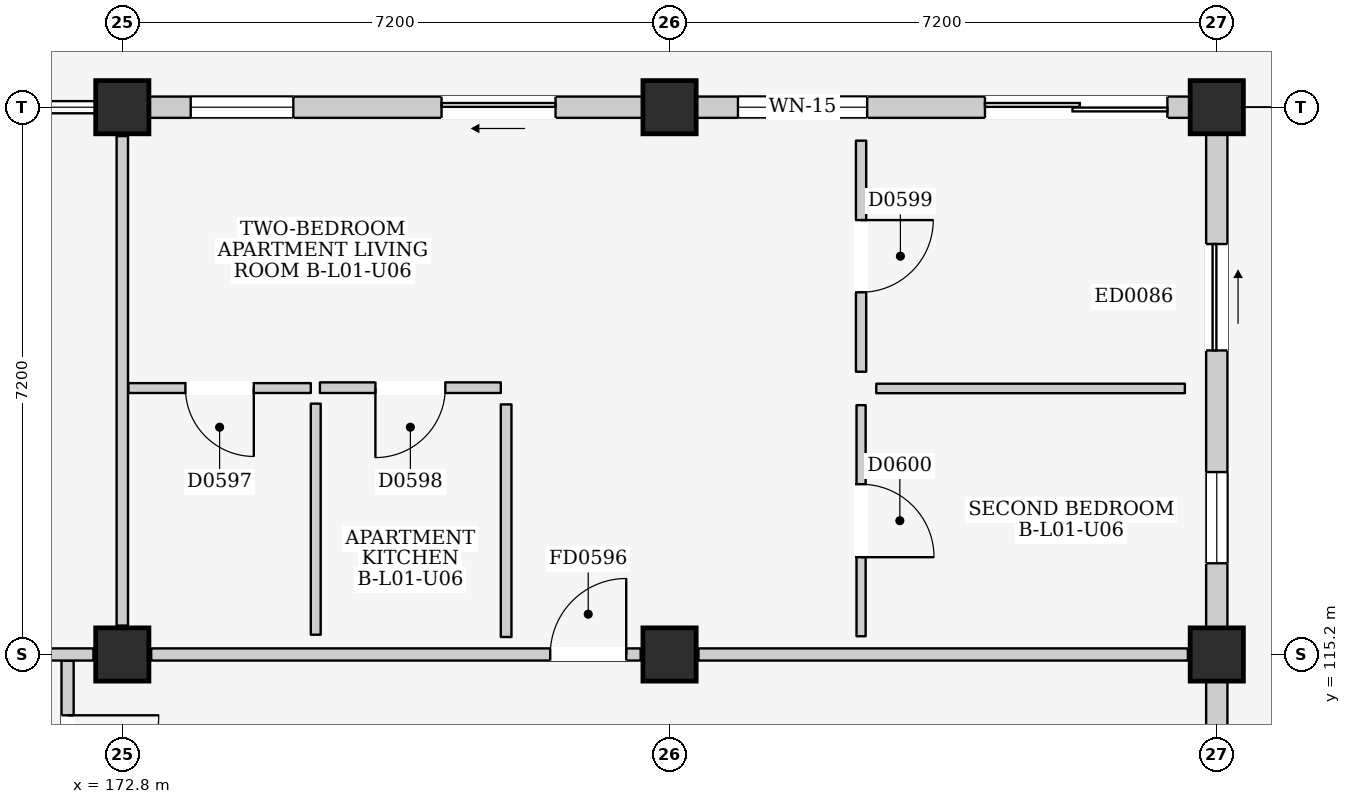
"""IFC4 building model, lengths in metres.
Left out: names, types, materials, properties, quantities, classifications, styles, units other than length and angle.
Written with IfcOpenShell. Run it as: python <this file> out.ifc"""

import sys

from ifc_helpers import new_model, si_unit, direction, frame, frame_2d, origin, origin_2d, place, context, subcontext, project, spatial, rectangle, extrude, element, fill, save


model = new_model("IFC4")
c1 = context("Model", 3, precision=1e-05, world=origin(), true_north=direction((0.0, 1.0)))
c2 = subcontext(c1, "Body", "Model", "MODEL_VIEW")
j1 = project(units=[si_unit("LENGTHUNIT", "METRE"), si_unit("PLANEANGLEUNIT", "RADIAN")], contexts=[c1])
p1 = place(None, origin())
s1 = spatial("IfcSite", under=j1, at=p1, CompositionType="ELEMENT")
p2 = place(p1, origin())
s2 = spatial("IfcBuilding", under=s1, at=p2, CompositionType="ELEMENT")
p3 = place(p2, frame((0.0, 0.0, 4.5)))
s3 = spatial("IfcBuildingStorey", under=s2, at=p3, CompositionType="ELEMENT", Elevation=4.5)
for number, where, z_axis, x_axis in (
    (1, (172.8, 115.2, 0.0), (0.0, 0.0, 1.0), (1.0, 0.0, 0.0)),
    (2, (172.8, 122.4, 0.0), (0.0, 0.0, 1.0), (1.0, 0.0, 0.0)),
    (3, (180.0, 115.2, 0.0), (0.0, 0.0, 1.0), (1.0, 0.0, 0.0)),
    (4, (180.0, 122.4, 0.0), (0.0, 0.0, 1.0), (1.0, 0.0, 0.0)),
    (5, (187.2, 115.2, 0.0), (0.0, 0.0, 1.0), (1.0, 0.0, 0.0)),
    (6, (187.2, 122.4, 0.0), (0.0, 0.0, 1.0), (1.0, 0.0, 0.0)),
):
    element("IfcColumn", number, at=place(p3, frame(where, z_axis=z_axis, x_axis=x_axis)), inside=s3, PredefinedType="COLUMN", context=c2, shape_type="SweptSolid", body=[
        extrude(rectangle(XDim=0.7, YDim=0.7, at=origin_2d()), origin(), (0.0, 0.0, 1.0), 4.5),
    ])
p4 = place(p3, frame((173.15, 122.4, 0.0), z_axis=(0.0, 0.0, 1.0), x_axis=(1.0, 0.0, 0.0)))
e7 = element("IfcWall", 7, at=p4, inside=s3, PredefinedType="ELEMENTEDWALL", context=c2, shape_type="SweptSolid", body=[
    extrude(rectangle(XDim=6.5, YDim=0.28, at=frame_2d((3.25, 0.0))), origin(), (0.0, 0.0, 1.0), 3.715),
])
p5 = place(p4, frame((3.85, 0.0, 0.0)))
e8 = element("IfcOpeningElement", 8, at=p5, cuts=e7, PredefinedType="OPENING", context=c2, shape_type="SweptSolid", body=[
    extrude(rectangle(XDim=1.5, YDim=2.12, at=frame_2d((0.75, 1.06))), frame((0.0, 0.155, 0.0), z_axis=(0.0, -1.0, 0.0), x_axis=(1.0, 0.0, 0.0)), (0.0, 0.0, 1.0), 0.31),
])
p6 = place(p4, frame((0.55, 0.0, 0.9)))
e9 = element("IfcOpeningElement", 9, at=p6, cuts=e7, PredefinedType="OPENING", context=c2, shape_type="SweptSolid", body=[
    extrude(rectangle(XDim=1.35, YDim=1.5, at=frame_2d((0.675, 0.75))), frame((0.0, 0.155, 0.0), z_axis=(0.0, -1.0, 0.0), x_axis=(1.0, 0.0, 0.0)), (0.0, 0.0, 1.0), 0.31),
])
p7 = place(p3, frame((187.2, 108.35, 0.0), z_axis=(0.0, 0.0, 1.0), x_axis=(0.0, 1.0, 0.0)))
e10 = element("IfcWall", 10, at=p7, inside=s3, PredefinedType="ELEMENTEDWALL", context=c2, shape_type="SweptSolid", body=[
    extrude(rectangle(XDim=6.5, YDim=0.28, at=frame_2d((3.25, 0.0))), origin(), (0.0, 0.0, 1.0), 3.715),
])
p8 = place(p7, frame((3.65, 0.0, 0.0)))
e11 = element("IfcOpeningElement", 11, at=p8, cuts=e10, PredefinedType="OPENING", context=c2, shape_type="SweptSolid", body=[
    extrude(rectangle(XDim=1.4, YDim=2.1, at=frame_2d((0.7, 1.05))), frame((0.0, 0.155, 0.0), z_axis=(0.0, -1.0, 0.0), x_axis=(1.0, 0.0, 0.0)), (0.0, 0.0, 1.0), 0.31),
])
p9 = place(p3, frame((180.35, 122.4, 0.0), z_axis=(0.0, 0.0, 1.0), x_axis=(1.0, 0.0, 0.0)))
e12 = element("IfcWall", 12, at=p9, inside=s3, PredefinedType="ELEMENTEDWALL", context=c2, shape_type="SweptSolid", body=[
    extrude(rectangle(XDim=6.5, YDim=0.28, at=frame_2d((3.25, 0.0))), origin(), (0.0, 0.0, 1.0), 3.715),
])
p10 = place(p9, frame((3.8, 0.0, 0.0)))
e13 = element("IfcOpeningElement", 13, at=p10, cuts=e12, PredefinedType="OPENING", context=c2, shape_type="SweptSolid", body=[
    extrude(rectangle(XDim=2.4, YDim=2.12, at=frame_2d((1.2, 1.06))), frame((0.0, 0.155, 0.0), z_axis=(0.0, -1.0, 0.0), x_axis=(1.0, 0.0, 0.0)), (0.0, 0.0, 1.0), 0.31),
])
p11 = place(p9, frame((0.55, 0.0, 0.9)))
e14 = element("IfcOpeningElement", 14, at=p11, cuts=e12, PredefinedType="OPENING", context=c2, shape_type="SweptSolid", body=[
    extrude(rectangle(XDim=1.7, YDim=1.45, at=frame_2d((0.85, 0.725))), frame((0.0, 0.155, 0.0), z_axis=(0.0, -1.0, 0.0), x_axis=(1.0, 0.0, 0.0)), (0.0, 0.0, 1.0), 0.31),
])
p12 = place(p3, frame((187.2, 115.55, 0.0), z_axis=(0.0, 0.0, 1.0), x_axis=(0.0, 1.0, 0.0)))
e15 = element("IfcWall", 15, at=p12, inside=s3, PredefinedType="ELEMENTEDWALL", context=c2, shape_type="SweptSolid", body=[
    extrude(rectangle(XDim=6.5, YDim=0.28, at=frame_2d((3.25, 0.0))), origin(), (0.0, 0.0, 1.0), 3.715),
])
p13 = place(p12, frame((3.65, 0.0, 0.0)))
e16 = element("IfcOpeningElement", 16, at=p13, cuts=e15, PredefinedType="OPENING", context=c2, shape_type="SweptSolid", body=[
    extrude(rectangle(XDim=1.4, YDim=2.1, at=frame_2d((0.7, 1.05))), frame((0.0, 0.155, 0.0), z_axis=(0.0, -1.0, 0.0), x_axis=(1.0, 0.0, 0.0)), (0.0, 0.0, 1.0), 0.31),
])
p14 = place(p12, frame((0.85, 0.0, 0.95)))
e17 = element("IfcOpeningElement", 17, at=p14, cuts=e15, PredefinedType="OPENING", context=c2, shape_type="SweptSolid", body=[
    extrude(rectangle(XDim=1.2, YDim=1.35, at=frame_2d((0.6, 0.675))), frame((0.0, 0.155, 0.0), z_axis=(0.0, -1.0, 0.0), x_axis=(1.0, 0.0, 0.0)), (0.0, 0.0, 1.0), 0.31),
])
p15 = place(p3, frame((172.08, 110.8, 0.0), z_axis=(0.0, 0.0, 1.0), x_axis=(0.0, 1.0, 0.0)))
e18 = element("IfcWall", 18, at=p15, inside=s3, PredefinedType="PARTITIONING", context=c2, shape_type="SweptSolid", body=[
    extrude(rectangle(XDim=4.32, YDim=0.16, at=frame_2d((2.16, 0.0))), origin(), (0.0, 0.0, 1.0), 4.25),
])
p16 = place(p15, frame((2.4, 0.0, 0.0)))
e19 = element("IfcOpeningElement", 19, at=p16, cuts=e18, PredefinedType="OPENING", context=c2, shape_type="SweptSolid", body=[
    extrude(rectangle(XDim=1.2, YDim=2.2, at=frame_2d((0.6, 1.1))), frame((0.0, 0.095, 0.0), z_axis=(0.0, -1.0, 0.0), x_axis=(1.0, 0.0, 0.0)), (0.0, 0.0, 1.0), 0.19),
])
p17 = place(p3, frame((165.98, 115.2, 0.0), z_axis=(0.0, 0.0, 1.0), x_axis=(1.0, 0.0, 0.0)))
e20 = element("IfcWall", 20, at=p17, inside=s3, PredefinedType="PARTITIONING", context=c2, shape_type="SweptSolid", body=[
    extrude(rectangle(XDim=6.44, YDim=0.16, at=frame_2d((3.22, 0.0))), origin(), (0.0, 0.0, 1.0), 3.635),
])
p18 = place(p17, frame((4.07, 0.0, 0.0)))
e21 = element("IfcOpeningElement", 21, at=p18, cuts=e20, PredefinedType="OPENING", context=c2, shape_type="SweptSolid", body=[
    extrude(rectangle(XDim=1.0, YDim=2.15, at=frame_2d((0.5, 1.075))), frame((0.0, 0.095, 0.0), z_axis=(0.0, -1.0, 0.0), x_axis=(1.0, 0.0, 0.0)), (0.0, 0.0, 1.0), 0.19),
])
p19 = place(p3, frame((172.8, 115.58, 0.0), z_axis=(0.0, 0.0, 1.0), x_axis=(0.0, 1.0, 0.0)))
e22 = element("IfcWall", 22, at=p19, inside=s3, PredefinedType="PARTITIONING", context=c2, shape_type="SweptSolid", body=[
    extrude(rectangle(XDim=6.44, YDim=0.15, at=frame_2d((3.22, 0.0))), origin(), (0.0, 0.0, 1.0), 3.685),
])
p20 = place(p3, frame((173.18, 115.2, 0.0), z_axis=(0.0, 0.0, 1.0), x_axis=(1.0, 0.0, 0.0)))
e23 = element("IfcWall", 23, at=p20, inside=s3, PredefinedType="PARTITIONING", context=c2, shape_type="SweptSolid", body=[
    extrude(rectangle(XDim=6.44, YDim=0.16, at=frame_2d((3.22, 0.0))), origin(), (0.0, 0.0, 1.0), 3.635),
])
p21 = place(p20, frame((5.25, 0.0, 0.0)))
e24 = element("IfcOpeningElement", 24, at=p21, cuts=e23, PredefinedType="OPENING", context=c2, shape_type="SweptSolid", body=[
    extrude(rectangle(XDim=1.0, YDim=2.15, at=frame_2d((0.5, 1.075))), frame((0.0, 0.095, 0.0), z_axis=(0.0, -1.0, 0.0), x_axis=(1.0, 0.0, 0.0)), (0.0, 0.0, 1.0), 0.19),
])
p22 = place(p3, frame((180.38, 115.2, 0.0), z_axis=(0.0, 0.0, 1.0), x_axis=(1.0, 0.0, 0.0)))
e25 = element("IfcWall", 25, at=p22, inside=s3, PredefinedType="PARTITIONING", context=c2, shape_type="SweptSolid", body=[
    extrude(rectangle(XDim=6.44, YDim=0.16, at=frame_2d((3.22, 0.0))), origin(), (0.0, 0.0, 1.0), 3.635),
])
p23 = place(p3, frame((172.88, 118.705, 0.0), z_axis=(0.0, 0.0, 1.0), x_axis=(1.0, 0.0, 0.0)))
e26 = element("IfcWall", 26, at=p23, inside=s3, PredefinedType="PARTITIONING", context=c2, shape_type="SweptSolid", body=[
    extrude(rectangle(XDim=2.4, YDim=0.13, at=frame_2d((1.2, 0.0))), origin(), (0.0, 0.0, 1.0), 4.25),
])
p24 = place(p23, frame((0.75, 0.0, 0.0)))
e27 = element("IfcOpeningElement", 27, at=p24, cuts=e26, PredefinedType="OPENING", context=c2, shape_type="SweptSolid", body=[
    extrude(rectangle(XDim=0.9, YDim=2.1, at=frame_2d((0.45, 1.05))), frame((0.0, 0.08, 0.0), z_axis=(0.0, -1.0, 0.0), x_axis=(1.0, 0.0, 0.0)), (0.0, 0.0, 1.0), 0.16),
])
p25 = place(p3, frame((175.345, 115.46, 0.0), z_axis=(0.0, 0.0, 1.0), x_axis=(0.0, 1.0, 0.0)))
e28 = element("IfcWall", 28, at=p25, inside=s3, PredefinedType="PARTITIONING", context=c2, shape_type="SweptSolid", body=[
    extrude(rectangle(XDim=3.04, YDim=0.13, at=frame_2d((1.52, 0.0))), origin(), (0.0, 0.0, 1.0), 4.25),
])
p26 = place(p3, frame((175.4, 118.71, 0.0), z_axis=(0.0, 0.0, 1.0), x_axis=(1.0, 0.0, 0.0)))
e29 = element("IfcWall", 29, at=p26, inside=s3, PredefinedType="PARTITIONING", context=c2, shape_type="SweptSolid", body=[
    extrude(rectangle(XDim=2.38, YDim=0.14, at=frame_2d((1.19, 0.0))), origin(), (0.0, 0.0, 1.0), 4.25),
])
p27 = place(p26, frame((0.73, 0.0, 0.0)))
e30 = element("IfcOpeningElement", 30, at=p27, cuts=e29, PredefinedType="OPENING", context=c2, shape_type="SweptSolid", body=[
    extrude(rectangle(XDim=0.92, YDim=2.1, at=frame_2d((0.46, 1.05))), frame((0.0, 0.085, 0.0), z_axis=(0.0, -1.0, 0.0), x_axis=(1.0, 0.0, 0.0)), (0.0, 0.0, 1.0), 0.17),
])
p28 = place(p3, frame((177.85, 115.43, 0.0), z_axis=(0.0, 0.0, 1.0), x_axis=(0.0, 1.0, 0.0)))
e31 = element("IfcWall", 31, at=p28, inside=s3, PredefinedType="PARTITIONING", context=c2, shape_type="SweptSolid", body=[
    extrude(rectangle(XDim=3.06, YDim=0.14, at=frame_2d((1.53, 0.0))), origin(), (0.0, 0.0, 1.0), 4.25),
])
p29 = place(p3, frame((182.52, 118.92, 0.0), z_axis=(0.0, 0.0, 1.0), x_axis=(0.0, 1.0, 0.0)))
e32 = element("IfcWall", 32, at=p29, inside=s3, PredefinedType="PARTITIONING", context=c2, shape_type="SweptSolid", body=[
    extrude(rectangle(XDim=3.04, YDim=0.135, at=frame_2d((1.52, 0.0))), origin(), (0.0, 0.0, 1.0), 4.25),
])
p30 = place(p29, frame((1.045, 0.0, 0.0)))
e33 = element("IfcOpeningElement", 33, at=p30, cuts=e32, PredefinedType="OPENING", context=c2, shape_type="SweptSolid", body=[
    extrude(rectangle(XDim=0.95, YDim=2.15, at=frame_2d((0.475, 1.075))), frame((0.0, 0.083, 0.0), z_axis=(0.0, -1.0, 0.0), x_axis=(1.0, 0.0, 0.0)), (0.0, 0.0, 1.0), 0.165),
])
p31 = place(p3, frame((182.72, 118.7, 0.0), z_axis=(0.0, 0.0, 1.0), x_axis=(1.0, 0.0, 0.0)))
e34 = element("IfcWall", 34, at=p31, inside=s3, PredefinedType="PARTITIONING", context=c2, shape_type="SweptSolid", body=[
    extrude(rectangle(XDim=4.06, YDim=0.125, at=frame_2d((2.03, 0.0))), origin(), (0.0, 0.0, 1.0), 4.25),
])
p32 = place(p3, frame((182.52, 115.44, 0.0), z_axis=(0.0, 0.0, 1.0), x_axis=(0.0, 1.0, 0.0)))
e35 = element("IfcWall", 35, at=p32, inside=s3, PredefinedType="PARTITIONING", context=c2, shape_type="SweptSolid", body=[
    extrude(rectangle(XDim=3.04, YDim=0.12, at=frame_2d((1.52, 0.0))), origin(), (0.0, 0.0, 1.0), 4.25),
])
p33 = place(p32, frame((1.04, 0.0, 0.0)))
e36 = element("IfcOpeningElement", 36, at=p33, cuts=e35, PredefinedType="OPENING", context=c2, shape_type="SweptSolid", body=[
    extrude(rectangle(XDim=0.96, YDim=2.15, at=frame_2d((0.48, 1.075))), frame((0.0, 0.075, 0.0), z_axis=(0.0, -1.0, 0.0), x_axis=(1.0, 0.0, 0.0)), (0.0, 0.0, 1.0), 0.15),
])
p34 = place(p5, frame((1.5, 0.0, 0.0), z_axis=(0.0, 0.0, 1.0), x_axis=(-1.0, 0.0, 0.0)))
e37 = element("IfcDoor", 37, at=p34, inside=s3, OperationType="SLIDING_TO_LEFT", PredefinedType="DOOR", context=c2, shape_type="SweptSolid", body=[
    extrude(rectangle(XDim=1.5, YDim=2.12, at=frame_2d((0.75, 1.06))), frame((0.0, 0.025, 0.0), z_axis=(0.0, -1.0, 0.0), x_axis=(1.0, 0.0, 0.0)), (0.0, 0.0, 1.0), 0.05),
])
fill(e8, e37)
p35 = place(p6, origin())
e38 = element("IfcWindow", 38, at=p35, inside=s3, PartitioningType="SINGLE_PANEL", PredefinedType="WINDOW", context=c2, shape_type="SweptSolid", body=[
    extrude(rectangle(XDim=1.35, YDim=1.5, at=frame_2d((0.675, 0.75))), frame((0.0, 0.03, 0.0), z_axis=(0.0, -1.0, 0.0), x_axis=(1.0, 0.0, 0.0)), (0.0, 0.0, 1.0), 0.06),
])
fill(e9, e38)
p36 = place(p10, frame((2.4, 0.0, 0.0), z_axis=(0.0, 0.0, 1.0), x_axis=(-1.0, 0.0, 0.0)))
e39 = element("IfcDoor", 39, at=p36, inside=s3, OperationType="DOUBLE_DOOR_SLIDING", PredefinedType="DOOR", context=c2, shape_type="SweptSolid", body=[
    extrude(rectangle(XDim=2.4, YDim=2.12, at=frame_2d((1.2, 1.06))), frame((0.0, 0.025, 0.0), z_axis=(0.0, -1.0, 0.0), x_axis=(1.0, 0.0, 0.0)), (0.0, 0.0, 1.0), 0.05),
])
fill(e13, e39)
p37 = place(p11, origin())
e40 = element("IfcWindow", 40, at=p37, inside=s3, PartitioningType="DOUBLE_PANEL_VERTICAL", PredefinedType="WINDOW", context=c2, shape_type="SweptSolid", body=[
    extrude(rectangle(XDim=1.7, YDim=1.45, at=frame_2d((0.85, 0.725))), frame((0.0, 0.03, 0.0), z_axis=(0.0, -1.0, 0.0), x_axis=(1.0, 0.0, 0.0)), (0.0, 0.0, 1.0), 0.06),
])
fill(e14, e40)
p38 = place(p13, frame((1.4, 0.0, 0.0), z_axis=(0.0, 0.0, 1.0), x_axis=(-1.0, 0.0, 0.0)))
e41 = element("IfcDoor", 41, at=p38, inside=s3, OperationType="SLIDING_TO_RIGHT", PredefinedType="DOOR", context=c2, shape_type="SweptSolid", body=[
    extrude(rectangle(XDim=1.4, YDim=2.1, at=frame_2d((0.7, 1.05))), frame((0.0, 0.025, 0.0), z_axis=(0.0, -1.0, 0.0), x_axis=(1.0, 0.0, 0.0)), (0.0, 0.0, 1.0), 0.05),
])
fill(e16, e41)
p39 = place(p14, origin())
e42 = element("IfcWindow", 42, at=p39, inside=s3, PartitioningType="SINGLE_PANEL", PredefinedType="WINDOW", context=c2, shape_type="SweptSolid", body=[
    extrude(rectangle(XDim=1.2, YDim=1.35, at=frame_2d((0.6, 0.675))), frame((0.0, 0.03, 0.0), z_axis=(0.0, -1.0, 0.0), x_axis=(1.0, 0.0, 0.0)), (0.0, 0.0, 1.0), 0.06),
])
fill(e17, e42)
p40 = place(p16, frame((1.2, 0.0, 0.0), z_axis=(0.0, 0.0, 1.0), x_axis=(-1.0, 0.0, 0.0)))
e43 = element("IfcDoor", 43, at=p40, inside=s3, OperationType="SINGLE_SWING_LEFT", PredefinedType="DOOR", context=c2, shape_type="SweptSolid", body=[
    extrude(rectangle(XDim=1.2, YDim=2.2, at=frame_2d((0.6, 1.1))), frame((0.0, 0.025, 0.0), z_axis=(0.0, -1.0, 0.0), x_axis=(1.0, 0.0, 0.0)), (0.0, 0.0, 1.0), 0.05),
])
fill(e19, e43)
p41 = place(p21, origin())
e44 = element("IfcDoor", 44, at=p41, inside=s3, OperationType="SINGLE_SWING_RIGHT", PredefinedType="DOOR", context=c2, shape_type="SweptSolid", body=[
    extrude(rectangle(XDim=1.0, YDim=2.15, at=frame_2d((0.5, 1.075))), frame((0.0, 0.025, 0.0), z_axis=(0.0, -1.0, 0.0), x_axis=(1.0, 0.0, 0.0)), (0.0, 0.0, 1.0), 0.05),
])
fill(e24, e44)
p42 = place(p24, frame((0.9, 0.0, 0.0), z_axis=(0.0, 0.0, 1.0), x_axis=(-1.0, 0.0, 0.0)))
e45 = element("IfcDoor", 45, at=p42, inside=s3, OperationType="SINGLE_SWING_LEFT", PredefinedType="DOOR", context=c2, shape_type="SweptSolid", body=[
    extrude(rectangle(XDim=0.9, YDim=2.1, at=frame_2d((0.45, 1.05))), frame((0.0, 0.025, 0.0), z_axis=(0.0, -1.0, 0.0), x_axis=(1.0, 0.0, 0.0)), (0.0, 0.0, 1.0), 0.05),
])
fill(e27, e45)
p43 = place(p27, frame((0.92, 0.0, 0.0), z_axis=(0.0, 0.0, 1.0), x_axis=(-1.0, 0.0, 0.0)))
e46 = element("IfcDoor", 46, at=p43, inside=s3, OperationType="SINGLE_SWING_RIGHT", PredefinedType="DOOR", context=c2, shape_type="SweptSolid", body=[
    extrude(rectangle(XDim=0.92, YDim=2.1, at=frame_2d((0.46, 1.05))), frame((0.0, 0.025, 0.0), z_axis=(0.0, -1.0, 0.0), x_axis=(1.0, 0.0, 0.0)), (0.0, 0.0, 1.0), 0.05),
])
fill(e30, e46)
p44 = place(p30, frame((0.95, 0.0, 0.0), z_axis=(0.0, 0.0, 1.0), x_axis=(-1.0, 0.0, 0.0)))
e47 = element("IfcDoor", 47, at=p44, inside=s3, OperationType="SINGLE_SWING_LEFT", PredefinedType="DOOR", context=c2, shape_type="SweptSolid", body=[
    extrude(rectangle(XDim=0.95, YDim=2.15, at=frame_2d((0.475, 1.075))), frame((0.0, 0.025, 0.0), z_axis=(0.0, -1.0, 0.0), x_axis=(1.0, 0.0, 0.0)), (0.0, 0.0, 1.0), 0.05),
])
fill(e33, e47)
p45 = place(p33, frame((0.96, 0.0, 0.0), z_axis=(0.0, 0.0, 1.0), x_axis=(-1.0, 0.0, 0.0)))
e48 = element("IfcDoor", 48, at=p45, inside=s3, OperationType="SINGLE_SWING_RIGHT", PredefinedType="DOOR", context=c2, shape_type="SweptSolid", body=[
    extrude(rectangle(XDim=0.96, YDim=2.15, at=frame_2d((0.48, 1.075))), frame((0.0, 0.025, 0.0), z_axis=(0.0, -1.0, 0.0), x_axis=(1.0, 0.0, 0.0)), (0.0, 0.0, 1.0), 0.05),
])
fill(e36, e48)
save(model, sys.argv[1])
